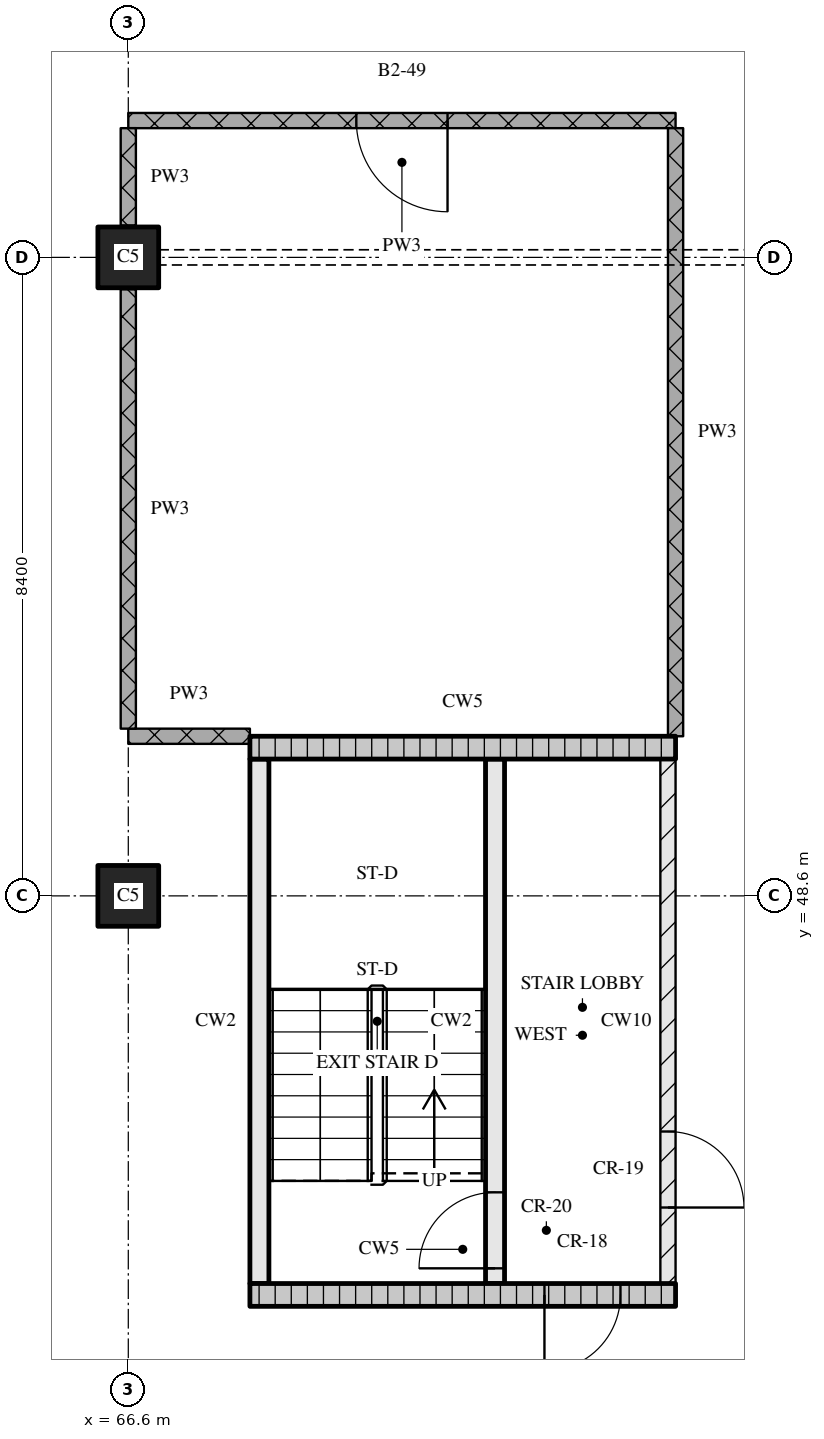
"""IFC4 building model, lengths in metres.
Left out: names, types, materials, properties, quantities, classifications, styles, units other than length and angle.
Written with IfcOpenShell. Run it as: python <this file> out.ifc"""

import sys

from ifc_helpers import new_model, si_unit, direction, frame, frame_2d, origin, origin_2d, place, context, subcontext, project, spatial, rectangle, extrude, element, fill, save


model = new_model("IFC4")
c1 = context("Model", 3, precision=1e-05, world=origin(), true_north=direction((0.0, 1.0)))
c2 = subcontext(c1, "Body", "Model", "MODEL_VIEW")
j1 = project(units=[si_unit("LENGTHUNIT", "METRE"), si_unit("PLANEANGLEUNIT", "RADIAN")], contexts=[c1])
p1 = place(None, origin())
s1 = spatial("IfcSite", under=j1, at=p1, CompositionType="ELEMENT")
p2 = place(p1, origin())
s2 = spatial("IfcBuilding", under=s1, at=p2, CompositionType="ELEMENT")
p3 = place(p2, frame((0.0, 0.0, 106.05)))
s3 = spatial("IfcBuildingStorey", under=s2, at=p3, CompositionType="ELEMENT", Elevation=106.05)
for number, where, z_axis, x_axis in (
    (1, (66.6, 48.6, 0.0), (0.0, 0.0, 1.0), (1.0, 0.0, 0.0)),
    (2, (66.6, 57.0, 0.0), (0.0, 0.0, 1.0), (1.0, 0.0, 0.0)),
):
    element("IfcColumn", number, at=place(p3, frame(where, z_axis=z_axis, x_axis=x_axis)), inside=s3, PredefinedType="COLUMN", context=c2, shape_type="SweptSolid", body=[
        extrude(rectangle(XDim=0.8, YDim=0.8, at=origin_2d()), origin(), (0.0, 0.0, 1.0), 3.6),
    ])
p4 = place(p3, frame((68.2, 43.35, 0.0), z_axis=(0.0, 0.0, 1.0), x_axis=(1.0, 0.0, 0.0)))
e3 = element("IfcWall", 3, at=p4, inside=s3, PredefinedType="SOLIDWALL", context=c2, shape_type="SweptSolid", body=[
    extrude(rectangle(XDim=5.6, YDim=0.3, at=frame_2d((2.8, 0.0))), origin(), (0.0, 0.0, 1.0), 3.32),
])
p5 = place(p4, frame((3.875, 0.0, 0.0)))
e4 = element("IfcOpeningElement", 4, at=p5, cuts=e3, PredefinedType="OPENING", context=c2, shape_type="SweptSolid", body=[
    extrude(rectangle(XDim=1.0, YDim=2.1, at=frame_2d((0.5, 1.05))), frame((0.0, 0.16, 0.0), z_axis=(0.0, -1.0, 0.0), x_axis=(1.0, 0.0, 0.0)), (0.0, 0.0, 1.0), 0.32),
])
p6 = place(p3, frame((68.325, 43.5, 0.0), z_axis=(0.0, 0.0, 1.0), x_axis=(0.0, 1.0, 0.0)))
e5 = element("IfcWall", 5, at=p6, inside=s3, PredefinedType="SOLIDWALL", context=c2, shape_type="SweptSolid", body=[
    extrude(rectangle(XDim=6.9, YDim=0.25, at=frame_2d((3.45, 0.0))), origin(), (0.0, 0.0, 1.0), 3.32),
])
p7 = place(p3, frame((71.425, 43.5, 0.0), z_axis=(0.0, 0.0, 1.0), x_axis=(0.0, 1.0, 0.0)))
e6 = element("IfcWall", 6, at=p7, inside=s3, PredefinedType="SOLIDWALL", context=c2, shape_type="SweptSolid", body=[
    extrude(rectangle(XDim=6.9, YDim=0.25, at=frame_2d((3.45, 0.0))), origin(), (0.0, 0.0, 1.0), 3.32),
])
p8 = place(p7, frame((0.2, 0.0, 0.0)))
e7 = element("IfcOpeningElement", 7, at=p8, cuts=e6, PredefinedType="OPENING", context=c2, shape_type="SweptSolid", body=[
    extrude(rectangle(XDim=1.0, YDim=2.1, at=frame_2d((0.5, 1.05))), frame((0.0, 0.135, 0.0), z_axis=(0.0, -1.0, 0.0), x_axis=(1.0, 0.0, 0.0)), (0.0, 0.0, 1.0), 0.27),
])
p9 = place(p3, frame((73.7, 43.5, 0.0), z_axis=(0.0, 0.0, 1.0), x_axis=(0.0, 1.0, 0.0)))
e8 = element("IfcWall", 8, at=p9, inside=s3, PredefinedType="PARTITIONING", context=c2, shape_type="SweptSolid", body=[
    extrude(rectangle(XDim=6.9, YDim=0.2, at=frame_2d((3.45, 0.0))), origin(), (0.0, 0.0, 1.0), 3.32),
])
p10 = place(p9, frame((1.0, 0.0, 0.0)))
e9 = element("IfcOpeningElement", 9, at=p10, cuts=e8, PredefinedType="OPENING", context=c2, shape_type="SweptSolid", body=[
    extrude(rectangle(XDim=1.0, YDim=2.1, at=frame_2d((0.5, 1.05))), frame((0.0, 0.11, 0.0), z_axis=(0.0, -1.0, 0.0), x_axis=(1.0, 0.0, 0.0)), (0.0, 0.0, 1.0), 0.22),
])
p11 = place(p3, frame((68.2, 50.55, 0.0), z_axis=(0.0, 0.0, 1.0), x_axis=(1.0, 0.0, 0.0)))
e10 = element("IfcWall", 10, at=p11, inside=s3, PredefinedType="SOLIDWALL", context=c2, shape_type="SweptSolid", body=[
    extrude(rectangle(XDim=5.6, YDim=0.3, at=frame_2d((2.8, 0.0))), origin(), (0.0, 0.0, 1.0), 3.32),
])
p12 = place(p3, frame((66.6, 50.7, 0.0), z_axis=(0.0, 0.0, 1.0), x_axis=(1.0, 0.0, 0.0)))
e11 = element("IfcWall", 11, at=p12, inside=s3, PredefinedType="PARTITIONING", context=c2, shape_type="SweptSolid", body=[
    extrude(rectangle(XDim=1.6, YDim=0.2, at=frame_2d((0.8, 0.0))), origin(), (0.0, 0.0, 1.0), 3.32),
])
p13 = place(p3, frame((73.8, 58.8, 0.0), z_axis=(0.0, 0.0, 1.0), x_axis=(-1.0, 0.0, 0.0)))
e12 = element("IfcWall", 12, at=p13, inside=s3, PredefinedType="PARTITIONING", context=c2, shape_type="SweptSolid", body=[
    extrude(rectangle(XDim=7.2, YDim=0.2, at=frame_2d((3.6, 0.0))), origin(), (0.0, 0.0, 1.0), 3.32),
])
p14 = place(p13, frame((3.0, 0.0, 0.0)))
e13 = element("IfcOpeningElement", 13, at=p14, cuts=e12, PredefinedType="OPENING", context=c2, shape_type="SweptSolid", body=[
    extrude(rectangle(XDim=1.2, YDim=2.1, at=frame_2d((0.6, 1.05))), frame((0.0, 0.11, 0.0), z_axis=(0.0, -1.0, 0.0), x_axis=(1.0, 0.0, 0.0)), (0.0, 0.0, 1.0), 0.22),
])
p15 = place(p3, frame((66.6, 56.58, 0.0), z_axis=(0.0, 0.0, 1.0), x_axis=(0.0, -1.0, 0.0)))
e14 = element("IfcWall", 14, at=p15, inside=s3, PredefinedType="PARTITIONING", context=c2, shape_type="SweptSolid", body=[
    extrude(rectangle(XDim=5.78, YDim=0.2, at=frame_2d((2.89, 0.0))), origin(), (0.0, 0.0, 1.0), 3.32),
])
p16 = place(p3, frame((66.6, 58.7, 0.0), z_axis=(0.0, 0.0, 1.0), x_axis=(0.0, -1.0, 0.0)))
e15 = element("IfcWall", 15, at=p16, inside=s3, PredefinedType="PARTITIONING", context=c2, shape_type="SweptSolid", body=[
    extrude(rectangle(XDim=1.28, YDim=0.2, at=frame_2d((0.64, 0.0))), origin(), (0.0, 0.0, 1.0), 3.32),
])
p17 = place(p3, frame((73.8, 58.7, 0.0), z_axis=(0.0, 0.0, 1.0), x_axis=(0.0, -1.0, 0.0)))
e16 = element("IfcWall", 16, at=p17, inside=s3, PredefinedType="PARTITIONING", context=c2, shape_type="SweptSolid", body=[
    extrude(rectangle(XDim=8.0, YDim=0.2, at=frame_2d((4.0, 0.0))), origin(), (0.0, 0.0, 1.0), 3.32),
])
p18 = place(p5, origin())
e17 = element("IfcDoor", 17, at=p18, inside=s3, OperationType="SINGLE_SWING_RIGHT", PredefinedType="DOOR", context=c2, shape_type="SweptSolid", body=[
    extrude(rectangle(XDim=1.0, YDim=2.1, at=frame_2d((0.5, 1.05))), frame((0.0, 0.025, 0.0), z_axis=(0.0, -1.0, 0.0), x_axis=(1.0, 0.0, 0.0)), (0.0, 0.0, 1.0), 0.05),
])
fill(e4, e17)
p19 = place(p8, origin())
e18 = element("IfcDoor", 18, at=p19, inside=s3, OperationType="SINGLE_SWING_LEFT", PredefinedType="DOOR", context=c2, shape_type="SweptSolid", body=[
    extrude(rectangle(XDim=1.0, YDim=2.1, at=frame_2d((0.5, 1.05))), frame((0.0, 0.025, 0.0), z_axis=(0.0, -1.0, 0.0), x_axis=(1.0, 0.0, 0.0)), (0.0, 0.0, 1.0), 0.05),
])
fill(e7, e18)
p20 = place(p10, origin())
e19 = element("IfcDoor", 19, at=p20, inside=s3, OperationType="SINGLE_SWING_RIGHT", PredefinedType="DOOR", context=c2, shape_type="SweptSolid", body=[
    extrude(rectangle(XDim=1.0, YDim=2.1, at=frame_2d((0.5, 1.05))), frame((0.0, 0.025, 0.0), z_axis=(0.0, -1.0, 0.0), x_axis=(1.0, 0.0, 0.0)), (0.0, 0.0, 1.0), 0.05),
])
fill(e9, e19)
p21 = place(p14, origin())
e20 = element("IfcDoor", 20, at=p21, inside=s3, OperationType="SINGLE_SWING_LEFT", PredefinedType="DOOR", context=c2, shape_type="SweptSolid", body=[
    extrude(rectangle(XDim=1.2, YDim=2.1, at=frame_2d((0.6, 1.05))), frame((0.0, 0.025, 0.0), z_axis=(0.0, -1.0, 0.0), x_axis=(1.0, 0.0, 0.0)), (0.0, 0.0, 1.0), 0.05),
])
fill(e13, e20)
save(model, sys.argv[1])
